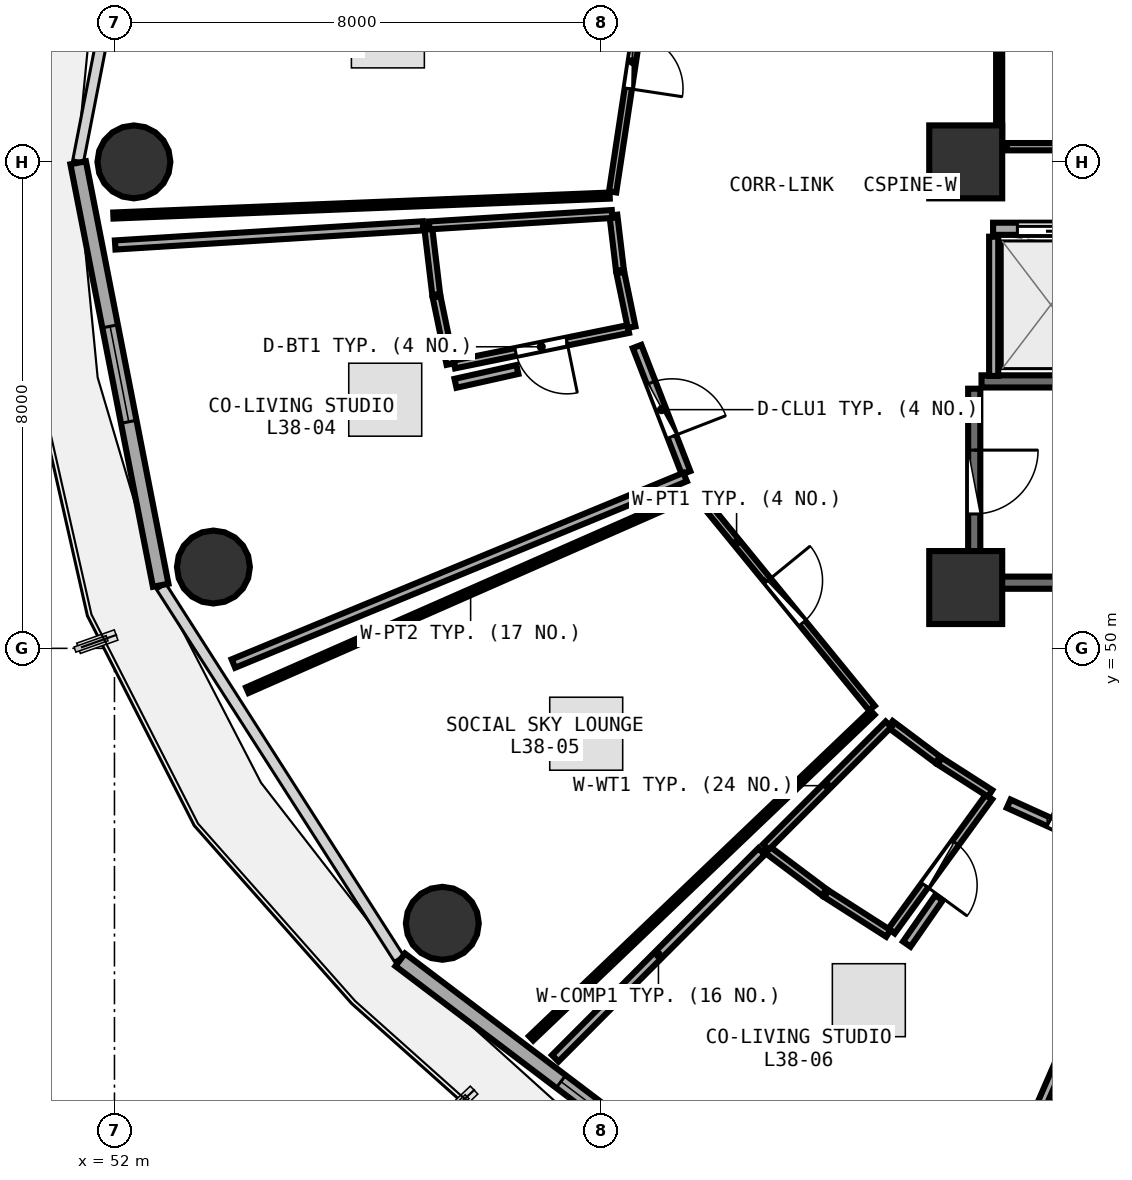
"""IFC4 building model, lengths in metres.
Left out: names, types, materials, properties, quantities, classifications, styles, units other than length and angle.
Written with IfcOpenShell. Run it as: python <this file> out.ifc"""

import sys

from ifc_helpers import new_model, si_unit, direction, frame, frame_2d, origin, origin_2d, place, context, subcontext, project, spatial, rectangle, circle, extrude, element, fill, save


model = new_model("IFC4")
c1 = context("Model", 3, precision=1e-05, world=origin(), true_north=direction((0.0, 1.0)))
c2 = subcontext(c1, "Body", "Model", "MODEL_VIEW")
j1 = project(units=[si_unit("LENGTHUNIT", "METRE"), si_unit("PLANEANGLEUNIT", "RADIAN")], contexts=[c1])
p1 = place(None, origin())
s1 = spatial("IfcSite", under=j1, at=p1, CompositionType="ELEMENT")
p2 = place(p1, origin())
s2 = spatial("IfcBuilding", under=s1, at=p2, CompositionType="ELEMENT")
p3 = place(p2, frame((0.0, 0.0, 150.6)))
s3 = spatial("IfcBuildingStorey", under=s2, at=p3, CompositionType="ELEMENT", Elevation=150.6)
for number, where, z_axis, x_axis in (
    (1, (66.0, 51.0, 0.0), (0.0, 0.0, 1.0), (1.0, 0.0, 0.0)),
    (2, (66.0, 58.0, 0.0), (0.0, 0.0, 1.0), (1.0, 0.0, 0.0)),
):
    element("IfcColumn", number, at=place(p3, frame(where, z_axis=z_axis, x_axis=x_axis)), inside=s3, PredefinedType="PILASTER", context=c2, shape_type="SweptSolid", body=[
        extrude(rectangle(XDim=1.2, YDim=1.2, at=origin_2d()), origin(), (0.0, 0.0, 1.0), 3.75),
    ])
for number, where, z_axis, x_axis in (
    (3, (52.32, 58.0, 0.0), (0.0, 0.0, 1.0), (1.0, 0.0, 0.0)),
    (4, (53.627, 51.337, 0.0), (0.0, 0.0, 1.0), (1.0, 0.0, 0.0)),
    (5, (57.392, 45.479, 0.0), (0.0, 0.0, 1.0), (1.0, 0.0, 0.0)),
):
    element("IfcColumn", number, at=place(p3, frame(where, z_axis=z_axis, x_axis=x_axis)), inside=s3, PredefinedType="COLUMN", context=c2, shape_type="SweptSolid", body=[
        extrude(circle(Radius=0.6, at=origin_2d()), origin(), (0.0, 0.0, 1.0), 3.75),
    ])
p4 = place(p3, frame((51.403, 57.985, 0.0), z_axis=(0.0, 0.0, 1.0), x_axis=(0.191716984769, -0.981450252306, 0.0)))
e6 = element("IfcWall", 6, at=p4, inside=s3, PredefinedType="SOLIDWALL", context=c2, shape_type="SweptSolid", body=[
    extrude(rectangle(XDim=7.079, YDim=0.26, at=frame_2d((3.54, 0.0))), origin(), (0.0, 0.0, 1.0), 3.475),
])
p5 = place(p4, frame((2.74, 0.0, 0.85)))
e7 = element("IfcOpeningElement", 7, at=p5, cuts=e6, PredefinedType="OPENING", context=c2, shape_type="SweptSolid", body=[
    extrude(rectangle(XDim=1.6, YDim=1.45, at=frame_2d((0.8, 0.725))), frame((0.0, 0.14, 0.0), z_axis=(0.0, -1.0, 0.0), x_axis=(1.0, 0.0, 0.0)), (0.0, 0.0, 1.0), 0.28),
])
p6 = place(p3, frame((56.699, 44.878, 0.0), z_axis=(0.0, 0.0, 1.0), x_axis=(0.797163719609, -0.603763202042, 0.0)))
e8 = element("IfcWall", 8, at=p6, inside=s3, PredefinedType="SOLIDWALL", context=c2, shape_type="SweptSolid", body=[
    extrude(rectangle(XDim=7.512, YDim=0.26, at=frame_2d((3.756, 0.0))), origin(), (0.0, 0.0, 1.0), 3.475),
])
p7 = place(p6, frame((3.316, 0.0, 0.85)))
e9 = element("IfcOpeningElement", 9, at=p7, cuts=e8, PredefinedType="OPENING", context=c2, shape_type="SweptSolid", body=[
    extrude(rectangle(XDim=1.6, YDim=1.45, at=frame_2d((0.8, 0.725))), frame((0.0, 0.14, 0.0), z_axis=(0.0, -1.0, 0.0), x_axis=(1.0, 0.0, 0.0)), (0.0, 0.0, 1.0), 0.28),
])
for number, where, z_axis, x_axis in (
    (10, (66.26, 51.08, 0.0), (0.0, 0.0, 1.0), (1.0, 0.0, 0.0)),
    (11, (73.42, 54.39, 0.0), (0.0, 0.0, 1.0), (-1.0, 0.0, 0.0)),
):
    element("IfcWall", number, at=place(p3, frame(where, z_axis=z_axis, x_axis=x_axis)), inside=s3, PredefinedType="SHEAR", context=c2, shape_type="SweptSolid", body=[
        extrude(rectangle(XDim=7.16, YDim=0.2, at=frame_2d((3.58, 0.0))), origin(), (0.0, 0.0, 1.0), 3.49),
    ])
p8 = place(p3, frame((66.14, 54.27, 0.0), z_axis=(0.0, 0.0, 1.0), x_axis=(0.0, -1.0, 0.0)))
e12 = element("IfcWall", 12, at=p8, inside=s3, PredefinedType="SHEAR", context=c2, shape_type="SweptSolid", body=[
    extrude(rectangle(XDim=3.07, YDim=0.2, at=frame_2d((1.535, 0.0))), origin(), (0.0, 0.0, 1.0), 3.49),
])
p9 = place(p8, frame((1.01, 0.0, 0.0)))
e13 = element("IfcOpeningElement", 13, at=p9, cuts=e12, PredefinedType="OPENING", context=c2, shape_type="SweptSolid", body=[
    extrude(rectangle(XDim=1.05, YDim=2.1, at=frame_2d((0.525, 1.05))), frame((0.0, 0.11, 0.0), z_axis=(0.0, -1.0, 0.0), x_axis=(1.0, 0.0, 0.0)), (0.0, 0.0, 1.0), 0.22),
])
p10 = place(p3, frame((66.45, 56.9, 0.0), z_axis=(0.0, 0.0, 1.0), x_axis=(1.0, 0.0, 0.0)))
e14 = element("IfcWall", 14, at=p10, inside=s3, PredefinedType="SOLIDWALL", context=c2, shape_type="SweptSolid", body=[
    extrude(rectangle(XDim=14.4, YDim=0.2, at=frame_2d((7.2, 0.0))), origin(), (0.0, 0.0, 1.0), 3.48),
])
p11 = place(p10, frame((0.4, 0.0, 0.0)))
e15 = element("IfcOpeningElement", 15, at=p11, cuts=e14, PredefinedType="OPENING", context=c2, shape_type="SweptSolid", body=[
    extrude(rectangle(XDim=1.1, YDim=2.1, at=frame_2d((0.55, 1.05))), frame((0.0, 0.11, 0.0), z_axis=(0.0, -1.0, 0.0), x_axis=(1.0, 0.0, 0.0)), (0.0, 0.0, 1.0), 0.22),
])
p12 = place(p10, frame((2.4, 0.0, 0.0)))
e16 = element("IfcOpeningElement", 16, at=p12, cuts=e14, PredefinedType="OPENING", context=c2, shape_type="SweptSolid", body=[
    extrude(rectangle(XDim=1.1, YDim=2.1, at=frame_2d((0.55, 1.05))), frame((0.0, 0.11, 0.0), z_axis=(0.0, -1.0, 0.0), x_axis=(1.0, 0.0, 0.0)), (0.0, 0.0, 1.0), 0.22),
])
p13 = place(p10, frame((4.4, 0.0, 0.0)))
e17 = element("IfcOpeningElement", 17, at=p13, cuts=e14, PredefinedType="OPENING", context=c2, shape_type="SweptSolid", body=[
    extrude(rectangle(XDim=1.1, YDim=2.1, at=frame_2d((0.55, 1.05))), frame((0.0, 0.11, 0.0), z_axis=(0.0, -1.0, 0.0), x_axis=(1.0, 0.0, 0.0)), (0.0, 0.0, 1.0), 0.22),
])
p14 = place(p3, frame((66.46, 54.48, 0.0), z_axis=(0.0, 0.0, 1.0), x_axis=(0.0, 1.0, 0.0)))
e18 = element("IfcWall", 18, at=p14, inside=s3, PredefinedType="PARTITIONING", context=c2, shape_type="SweptSolid", body=[
    extrude(rectangle(XDim=2.29, YDim=0.15, at=frame_2d((1.145, 0.0))), origin(), (0.0, 0.0, 1.0), 3.48),
])
p15 = place(p3, frame((66.675, 58.25, 0.0), z_axis=(0.0, 0.0, 1.0), x_axis=(1.0, 0.0, 0.0)))
e19 = element("IfcWall", 19, at=p15, inside=s3, PredefinedType="PARTITIONING", context=c2, shape_type="SweptSolid", body=[
    extrude(rectangle(XDim=3.265, YDim=0.12, at=frame_2d((1.632, 0.0))), origin(), (0.0, 0.0, 1.0), 3.48),
])
p16 = place(p15, frame((1.182, 0.0, 0.0)))
e20 = element("IfcOpeningElement", 20, at=p16, cuts=e19, PredefinedType="OPENING", context=c2, shape_type="SweptSolid", body=[
    extrude(rectangle(XDim=0.9, YDim=2.08, at=frame_2d((0.45, 1.04))), frame((0.0, 0.07, 0.0), z_axis=(0.0, -1.0, 0.0), x_axis=(1.0, 0.0, 0.0)), (0.0, 0.0, 1.0), 0.14),
])
p17 = place(p3, frame((60.843, 61.796, 0.0), z_axis=(0.0, 0.0, 1.0), x_axis=(-0.149807046494, -0.988715251638, 0.0)))
e21 = element("IfcWall", 21, at=p17, inside=s3, PredefinedType="PARTITIONING", context=c2, shape_type="SweptSolid", body=[
    extrude(rectangle(XDim=4.338, YDim=0.12, at=frame_2d((2.169, 0.0))), origin(), (0.0, 0.0, 1.0), 2.975),
])
p18 = place(p17, frame((1.719, 0.0, 0.0)))
e22 = element("IfcOpeningElement", 22, at=p18, cuts=e21, PredefinedType="OPENING", context=c2, shape_type="SweptSolid", body=[
    extrude(rectangle(XDim=0.9, YDim=2.08, at=frame_2d((0.45, 1.04))), frame((0.0, 0.07, 0.0), z_axis=(0.0, -1.0, 0.0), x_axis=(1.0, 0.0, 0.0)), (0.0, 0.0, 1.0), 0.14),
])
p19 = place(p3, frame((60.45, 55.251, 0.0), z_axis=(0.0, 0.0, 1.0), x_axis=(-0.979866857251, -0.199652052484, 0.0)))
e23 = element("IfcWall", 23, at=p19, inside=s3, PredefinedType="PLUMBINGWALL", context=c2, shape_type="SweptSolid", body=[
    extrude(rectangle(XDim=2.92, YDim=0.13, at=frame_2d((1.46, 0.0))), origin(), (0.0, 0.0, 1.0), 3.175),
])
p20 = place(p19, frame((1.03, 0.0, 0.0)))
e24 = element("IfcOpeningElement", 24, at=p20, cuts=e23, PredefinedType="OPENING", context=c2, shape_type="SweptSolid", body=[
    extrude(rectangle(XDim=0.86, YDim=2.05, at=frame_2d((0.43, 1.025))), frame((0.0, 0.075, 0.0), z_axis=(0.0, -1.0, 0.0), x_axis=(1.0, 0.0, 0.0)), (0.0, 0.0, 1.0), 0.15),
])
p21 = place(p3, frame((60.595, 54.964, 0.0), z_axis=(0.0, 0.0, 1.0), x_axis=(0.361769005858, -0.932267765398, 0.0)))
e25 = element("IfcWall", 25, at=p21, inside=s3, PredefinedType="PARTITIONING", context=c2, shape_type="SweptSolid", body=[
    extrude(rectangle(XDim=2.227, YDim=0.15, at=frame_2d((1.114, 0.0))), origin(), (0.0, 0.0, 1.0), 3.235),
])
p22 = place(p21, frame((0.639, 0.0, 0.0)))
e26 = element("IfcOpeningElement", 26, at=p22, cuts=e25, PredefinedType="OPENING", context=c2, shape_type="SweptSolid", body=[
    extrude(rectangle(XDim=0.95, YDim=2.08, at=frame_2d((0.475, 1.04))), frame((0.0, 0.085, 0.0), z_axis=(0.0, -1.0, 0.0), x_axis=(1.0, 0.0, 0.0)), (0.0, 0.0, 1.0), 0.17),
])
p23 = place(p3, frame((61.604, 52.511, 0.0), z_axis=(0.0, 0.0, 1.0), x_axis=(0.632491819148, -0.77456703952, 0.0)))
e27 = element("IfcWall", 27, at=p23, inside=s3, PredefinedType="PARTITIONING", context=c2, shape_type="SweptSolid", body=[
    extrude(rectangle(XDim=4.511, YDim=0.12, at=frame_2d((2.255, 0.0))), origin(), (0.0, 0.0, 1.0), 2.975),
])
p24 = place(p23, frame((1.805, 0.0, 0.0)))
e28 = element("IfcOpeningElement", 28, at=p24, cuts=e27, PredefinedType="OPENING", context=c2, shape_type="SweptSolid", body=[
    extrude(rectangle(XDim=0.9, YDim=2.08, at=frame_2d((0.45, 1.04))), frame((0.0, 0.07, 0.0), z_axis=(0.0, -1.0, 0.0), x_axis=(1.0, 0.0, 0.0)), (0.0, 0.0, 1.0), 0.14),
])
p25 = place(p3, frame((66.383, 47.555, 0.0), z_axis=(0.0, 0.0, 1.0), x_axis=(-0.588001344837, -0.808859949849, 0.0)))
e29 = element("IfcWall", 29, at=p25, inside=s3, PredefinedType="PLUMBINGWALL", context=c2, shape_type="SweptSolid", body=[
    extrude(rectangle(XDim=2.727, YDim=0.13, at=frame_2d((1.364, 0.0))), origin(), (0.0, 0.0, 1.0), 3.235),
])
p26 = place(p25, frame((0.934, 0.0, 0.0)))
e30 = element("IfcOpeningElement", 30, at=p26, cuts=e29, PredefinedType="OPENING", context=c2, shape_type="SweptSolid", body=[
    extrude(rectangle(XDim=0.86, YDim=2.05, at=frame_2d((0.43, 1.025))), frame((0.0, 0.075, 0.0), z_axis=(0.0, -1.0, 0.0), x_axis=(1.0, 0.0, 0.0)), (0.0, 0.0, 1.0), 0.15),
])
p27 = place(p3, frame((66.707, 47.445, 0.0), z_axis=(0.0, 0.0, 1.0), x_axis=(0.910872904928, -0.412686989216, 0.0)))
e31 = element("IfcWall", 31, at=p27, inside=s3, PredefinedType="PARTITIONING", context=c2, shape_type="SweptSolid", body=[
    extrude(rectangle(XDim=2.407, YDim=0.15, at=frame_2d((1.204, 0.0))), origin(), (0.0, 0.0, 1.0), 3.235),
])
p28 = place(p27, frame((0.729, 0.0, 0.0)))
e32 = element("IfcOpeningElement", 32, at=p28, cuts=e31, PredefinedType="OPENING", context=c2, shape_type="SweptSolid", body=[
    extrude(rectangle(XDim=0.95, YDim=2.08, at=frame_2d((0.475, 1.04))), frame((0.0, 0.085, 0.0), z_axis=(0.0, -1.0, 0.0), x_axis=(1.0, 0.0, 0.0)), (0.0, 0.0, 1.0), 0.17),
])
p29 = place(p3, frame((66.55, 60.68, 0.0), z_axis=(0.0, 0.0, 1.0), x_axis=(0.0, -1.0, 0.0)))
e33 = element("IfcWall", 33, at=p29, inside=s3, PredefinedType="PARTITIONING", context=c2, shape_type="SweptSolid", body=[
    extrude(rectangle(XDim=2.383, YDim=0.1, at=frame_2d((1.191, 0.0))), origin(), (0.0, 0.0, 1.0), 3.48),
])
p30 = place(p3, frame((66.645, 39.297, 0.0), z_axis=(0.0, 0.0, 1.0), x_axis=(0.364957999702, 0.931023983823, 0.0)))
e34 = element("IfcWall", 34, at=p30, inside=s3, PredefinedType="PARTITIONING", context=c2, shape_type="SweptSolid", body=[
    extrude(rectangle(XDim=7.464, YDim=0.1, at=frame_2d((3.732, 0.0))), origin(), (0.0, 0.0, 1.0), 3.025),
])
p31 = place(p3, frame((60.144, 57.445, 0.0), z_axis=(0.0, 0.0, 1.0), x_axis=(-0.99919531507, -0.040108881097, 0.0)))
e35 = element("IfcWall", 35, at=p31, inside=s3, PredefinedType="PARTITIONING", context=c2, shape_type="SweptSolid", body=[
    extrude(rectangle(XDim=8.169, YDim=0.1, at=frame_2d((4.084, 0.0))), origin(), (0.0, 0.0, 1.0), 3.025),
])
p32 = place(p3, frame((60.205, 57.124, 0.0), z_axis=(0.0, 0.0, 1.0), x_axis=(0.118797046487, -0.992918557459, 0.0)))
e36 = element("IfcWall", 36, at=p32, inside=s3, PredefinedType="PLUMBINGWALL", context=c2, shape_type="SweptSolid", body=[
    extrude(rectangle(XDim=0.912, YDim=0.13, at=frame_2d((0.456, 0.0))), origin(), (0.0, 0.0, 1.0), 3.48),
])
p33 = place(p3, frame((60.32, 56.178, 0.0), z_axis=(0.0, 0.0, 1.0), x_axis=(0.202067144879, -0.979371670491, 0.0)))
e37 = element("IfcWall", 37, at=p33, inside=s3, PredefinedType="PLUMBINGWALL", context=c2, shape_type="SweptSolid", body=[
    extrude(rectangle(XDim=0.915, YDim=0.13, at=frame_2d((0.457, 0.0))), origin(), (0.0, 0.0, 1.0), 3.48),
])
p34 = place(p3, frame((57.526, 54.676, 0.0), z_axis=(0.0, 0.0, 1.0), x_axis=(-0.202111317069, 0.979362555703, 0.0)))
e38 = element("IfcWall", 38, at=p34, inside=s3, PredefinedType="PLUMBINGWALL", context=c2, shape_type="SweptSolid", body=[
    extrude(rectangle(XDim=1.127, YDim=0.13, at=frame_2d((0.563, 0.0))), origin(), (0.0, 0.0, 1.0), 3.48),
])
p35 = place(p3, frame((57.292, 55.819, 0.0), z_axis=(0.0, 0.0, 1.0), x_axis=(-0.11846804652, 0.992957865145, 0.0)))
e39 = element("IfcWall", 39, at=p35, inside=s3, PredefinedType="PLUMBINGWALL", context=c2, shape_type="SweptSolid", body=[
    extrude(rectangle(XDim=1.123, YDim=0.13, at=frame_2d((0.562, 0.0))), origin(), (0.0, 0.0, 1.0), 3.48),
])
p36 = place(p3, frame((57.176, 56.955, 0.0), z_axis=(0.0, 0.0, 1.0), x_axis=(0.998056675164, 0.062312704652, 0.0)))
e40 = element("IfcWall", 40, at=p36, inside=s3, PredefinedType="PLUMBINGWALL", context=c2, shape_type="SweptSolid", body=[
    extrude(rectangle(XDim=3.013, YDim=0.13, at=frame_2d((1.506, 0.0))), origin(), (0.0, 0.0, 1.0), 3.175),
])
p37 = place(p3, frame((61.385, 52.817, 0.0), z_axis=(0.0, 0.0, 1.0), x_axis=(-0.924352507704, -0.381539567412, 0.0)))
e41 = element("IfcWall", 41, at=p37, inside=s3, PredefinedType="PARTITIONING", context=c2, shape_type="SweptSolid", body=[
    extrude(rectangle(XDim=8.037, YDim=0.15, at=frame_2d((4.019, 0.0))), origin(), (0.0, 0.0, 1.0), 2.975),
])
p38 = place(p3, frame((52.012, 56.634, 0.0), z_axis=(0.0, 0.0, 1.0), x_axis=(0.998071814667, 0.062069741162, 0.0)))
e42 = element("IfcWall", 42, at=p38, inside=s3, PredefinedType="PARTITIONING", context=c2, shape_type="SweptSolid", body=[
    extrude(rectangle(XDim=5.074, YDim=0.15, at=frame_2d((2.537, 0.0))), origin(), (0.0, 0.0, 1.0), 3.025),
])
p39 = place(p3, frame((57.609, 54.359, 0.0), z_axis=(0.0, 0.0, 1.0), x_axis=(0.97598825513, 0.217823152693, 0.0)))
e43 = element("IfcWall", 43, at=p39, inside=s3, PredefinedType="PARTITIONING", context=c2, shape_type="SweptSolid", body=[
    extrude(rectangle(XDim=1.042, YDim=0.15, at=frame_2d((0.521, 0.0))), origin(), (0.0, 0.0, 1.0), 3.175),
])
p40 = place(p3, frame((64.466, 48.943, 0.0), z_axis=(0.0, 0.0, 1.0), x_axis=(-0.723511266615, -0.690312572014, 0.0)))
e44 = element("IfcWall", 44, at=p40, inside=s3, PredefinedType="PARTITIONING", context=c2, shape_type="SweptSolid", body=[
    extrude(rectangle(XDim=7.758, YDim=0.1, at=frame_2d((3.879, 0.0))), origin(), (0.0, 0.0, 1.0), 3.025),
])
p41 = place(p3, frame((54.186, 49.312, 0.0), z_axis=(0.0, 0.0, 1.0), x_axis=(0.915373356269, 0.402606034024, 0.0)))
e45 = element("IfcWall", 45, at=p41, inside=s3, PredefinedType="PARTITIONING", context=c2, shape_type="SweptSolid", body=[
    extrude(rectangle(XDim=8.023, YDim=0.1, at=frame_2d((4.011, 0.0))), origin(), (0.0, 0.0, 1.0), 2.975),
])
p42 = place(p3, frame((64.759, 48.753, 0.0), z_axis=(0.0, 0.0, 1.0), x_axis=(0.800390142897, -0.599479456824, 0.0)))
e46 = element("IfcWall", 46, at=p42, inside=s3, PredefinedType="PLUMBINGWALL", context=c2, shape_type="SweptSolid", body=[
    extrude(rectangle(XDim=0.976, YDim=0.13, at=frame_2d((0.488, 0.0))), origin(), (0.0, 0.0, 1.0), 2.975),
])
p43 = place(p3, frame((65.573, 48.145, 0.0), z_axis=(0.0, 0.0, 1.0), x_axis=(0.842104586495, -0.539314254776, 0.0)))
e47 = element("IfcWall", 47, at=p43, inside=s3, PredefinedType="PLUMBINGWALL", context=c2, shape_type="SweptSolid", body=[
    extrude(rectangle(XDim=0.984, YDim=0.13, at=frame_2d((0.492, 0.0))), origin(), (0.0, 0.0, 1.0), 3.48),
])
p44 = place(p3, frame((64.727, 45.312, 0.0), z_axis=(0.0, 0.0, 1.0), x_axis=(-0.842330007588, 0.538962112135, 0.0)))
e48 = element("IfcWall", 48, at=p44, inside=s3, PredefinedType="PLUMBINGWALL", context=c2, shape_type="SweptSolid", body=[
    extrude(rectangle(XDim=1.21, YDim=0.13, at=frame_2d((0.605, 0.0))), origin(), (0.0, 0.0, 1.0), 2.975),
])
p45 = place(p3, frame((63.675, 45.987, 0.0), z_axis=(0.0, 0.0, 1.0), x_axis=(-0.8, 0.6, 0.0)))
e49 = element("IfcWall", 49, at=p45, inside=s3, PredefinedType="PLUMBINGWALL", context=c2, shape_type="SweptSolid", body=[
    extrude(rectangle(XDim=1.2, YDim=0.13, at=frame_2d((0.6, 0.0))), origin(), (0.0, 0.0, 1.0), 3.48),
])
p46 = place(p3, frame((62.713, 46.733, 0.0), z_axis=(0.0, 0.0, 1.0), x_axis=(0.706764315195, 0.707449081396, 0.0)))
e50 = element("IfcWall", 50, at=p46, inside=s3, PredefinedType="PLUMBINGWALL", context=c2, shape_type="SweptSolid", body=[
    extrude(rectangle(XDim=2.852, YDim=0.13, at=frame_2d((1.426, 0.0))), origin(), (0.0, 0.0, 1.0), 3.235),
])
p47 = place(p3, frame((68.938, 46.39, 0.0), z_axis=(0.0, 0.0, 1.0), x_axis=(-0.398074464123, -0.917353105959, 0.0)))
e51 = element("IfcWall", 51, at=p47, inside=s3, PredefinedType="PARTITIONING", context=c2, shape_type="SweptSolid", body=[
    extrude(rectangle(XDim=7.481, YDim=0.15, at=frame_2d((3.741, 0.0))), origin(), (0.0, 0.0, 1.0), 3.025),
])
p48 = place(p3, frame((59.249, 43.258, 0.0), z_axis=(0.0, 0.0, 1.0), x_axis=(0.706293548202, 0.707919079958, 0.0)))
e52 = element("IfcWall", 52, at=p48, inside=s3, PredefinedType="PARTITIONING", context=c2, shape_type="SweptSolid", body=[
    extrude(rectangle(XDim=4.806, YDim=0.15, at=frame_2d((2.403, 0.0))), origin(), (0.0, 0.0, 1.0), 3.025),
])
p49 = place(p3, frame((65.031, 45.136, 0.0), z_axis=(0.0, 0.0, 1.0), x_axis=(0.570563407037, 0.821253553143, 0.0)))
e53 = element("IfcWall", 53, at=p49, inside=s3, PredefinedType="PARTITIONING", context=c2, shape_type="SweptSolid", body=[
    extrude(rectangle(XDim=0.928, YDim=0.15, at=frame_2d((0.464, 0.0))), origin(), (0.0, 0.0, 1.0), 3.48),
])
p50 = place(p5, origin())
e54 = element("IfcWindow", 54, at=p50, inside=s3, PartitioningType="SINGLE_PANEL", PredefinedType="WINDOW", context=c2, shape_type="SweptSolid", body=[
    extrude(rectangle(XDim=1.6, YDim=1.45, at=frame_2d((0.8, 0.725))), frame((0.0, 0.03, 0.0), z_axis=(0.0, -1.0, 0.0), x_axis=(1.0, 0.0, 0.0)), (0.0, 0.0, 1.0), 0.06),
])
fill(e7, e54)
p51 = place(p7, origin())
e55 = element("IfcWindow", 55, at=p51, inside=s3, PartitioningType="SINGLE_PANEL", PredefinedType="WINDOW", context=c2, shape_type="SweptSolid", body=[
    extrude(rectangle(XDim=1.6, YDim=1.45, at=frame_2d((0.8, 0.725))), frame((0.0, 0.03, 0.0), z_axis=(0.0, -1.0, 0.0), x_axis=(1.0, 0.0, 0.0)), (0.0, 0.0, 1.0), 0.06),
])
fill(e9, e55)
p52 = place(p9, origin())
e56 = element("IfcDoor", 56, at=p52, inside=s3, OperationType="SINGLE_SWING_LEFT", PredefinedType="DOOR", context=c2, shape_type="SweptSolid", body=[
    extrude(rectangle(XDim=1.05, YDim=2.1, at=frame_2d((0.525, 1.05))), frame((0.0, 0.025, 0.0), z_axis=(0.0, -1.0, 0.0), x_axis=(1.0, 0.0, 0.0)), (0.0, 0.0, 1.0), 0.05),
])
fill(e13, e56)
p53 = place(p11, origin())
e57 = element("IfcDoor", 57, at=p53, inside=s3, OperationType="DOUBLE_DOOR_SLIDING", PredefinedType="DOOR", context=c2, shape_type="SweptSolid", body=[
    extrude(rectangle(XDim=1.1, YDim=2.1, at=frame_2d((0.55, 1.05))), frame((0.0, 0.025, 0.0), z_axis=(0.0, -1.0, 0.0), x_axis=(1.0, 0.0, 0.0)), (0.0, 0.0, 1.0), 0.05),
])
fill(e15, e57)
p54 = place(p18, origin())
e58 = element("IfcDoor", 58, at=p54, inside=s3, OperationType="SINGLE_SWING_RIGHT", PredefinedType="DOOR", context=c2, shape_type="SweptSolid", body=[
    extrude(rectangle(XDim=0.9, YDim=2.08, at=frame_2d((0.45, 1.04))), frame((0.0, 0.025, 0.0), z_axis=(0.0, -1.0, 0.0), x_axis=(1.0, 0.0, 0.0)), (0.0, 0.0, 1.0), 0.05),
])
fill(e22, e58)
p55 = place(p20, origin())
e59 = element("IfcDoor", 59, at=p55, inside=s3, OperationType="SINGLE_SWING_LEFT", PredefinedType="DOOR", context=c2, shape_type="SweptSolid", body=[
    extrude(rectangle(XDim=0.86, YDim=2.05, at=frame_2d((0.43, 1.025))), frame((0.0, 0.025, 0.0), z_axis=(0.0, -1.0, 0.0), x_axis=(1.0, 0.0, 0.0)), (0.0, 0.0, 1.0), 0.05),
])
fill(e24, e59)
p56 = place(p22, origin())
e60 = element("IfcDoor", 60, at=p56, inside=s3, OperationType="SINGLE_SWING_RIGHT", PredefinedType="DOOR", context=c2, shape_type="SweptSolid", body=[
    extrude(rectangle(XDim=0.95, YDim=2.08, at=frame_2d((0.475, 1.04))), frame((0.0, 0.025, 0.0), z_axis=(0.0, -1.0, 0.0), x_axis=(1.0, 0.0, 0.0)), (0.0, 0.0, 1.0), 0.05),
])
fill(e26, e60)
p57 = place(p24, origin())
e61 = element("IfcDoor", 61, at=p57, inside=s3, OperationType="SINGLE_SWING_LEFT", PredefinedType="DOOR", context=c2, shape_type="SweptSolid", body=[
    extrude(rectangle(XDim=0.9, YDim=2.08, at=frame_2d((0.45, 1.04))), frame((0.0, 0.025, 0.0), z_axis=(0.0, -1.0, 0.0), x_axis=(1.0, 0.0, 0.0)), (0.0, 0.0, 1.0), 0.05),
])
fill(e28, e61)
p58 = place(p26, origin())
e62 = element("IfcDoor", 62, at=p58, inside=s3, OperationType="SINGLE_SWING_RIGHT", PredefinedType="DOOR", context=c2, shape_type="SweptSolid", body=[
    extrude(rectangle(XDim=0.86, YDim=2.05, at=frame_2d((0.43, 1.025))), frame((0.0, 0.025, 0.0), z_axis=(0.0, -1.0, 0.0), x_axis=(1.0, 0.0, 0.0)), (0.0, 0.0, 1.0), 0.05),
])
fill(e30, e62)
p59 = place(p28, origin())
e63 = element("IfcDoor", 63, at=p59, inside=s3, OperationType="SINGLE_SWING_LEFT", PredefinedType="DOOR", context=c2, shape_type="SweptSolid", body=[
    extrude(rectangle(XDim=0.95, YDim=2.08, at=frame_2d((0.475, 1.04))), frame((0.0, 0.025, 0.0), z_axis=(0.0, -1.0, 0.0), x_axis=(1.0, 0.0, 0.0)), (0.0, 0.0, 1.0), 0.05),
])
fill(e32, e63)
save(model, sys.argv[1])
